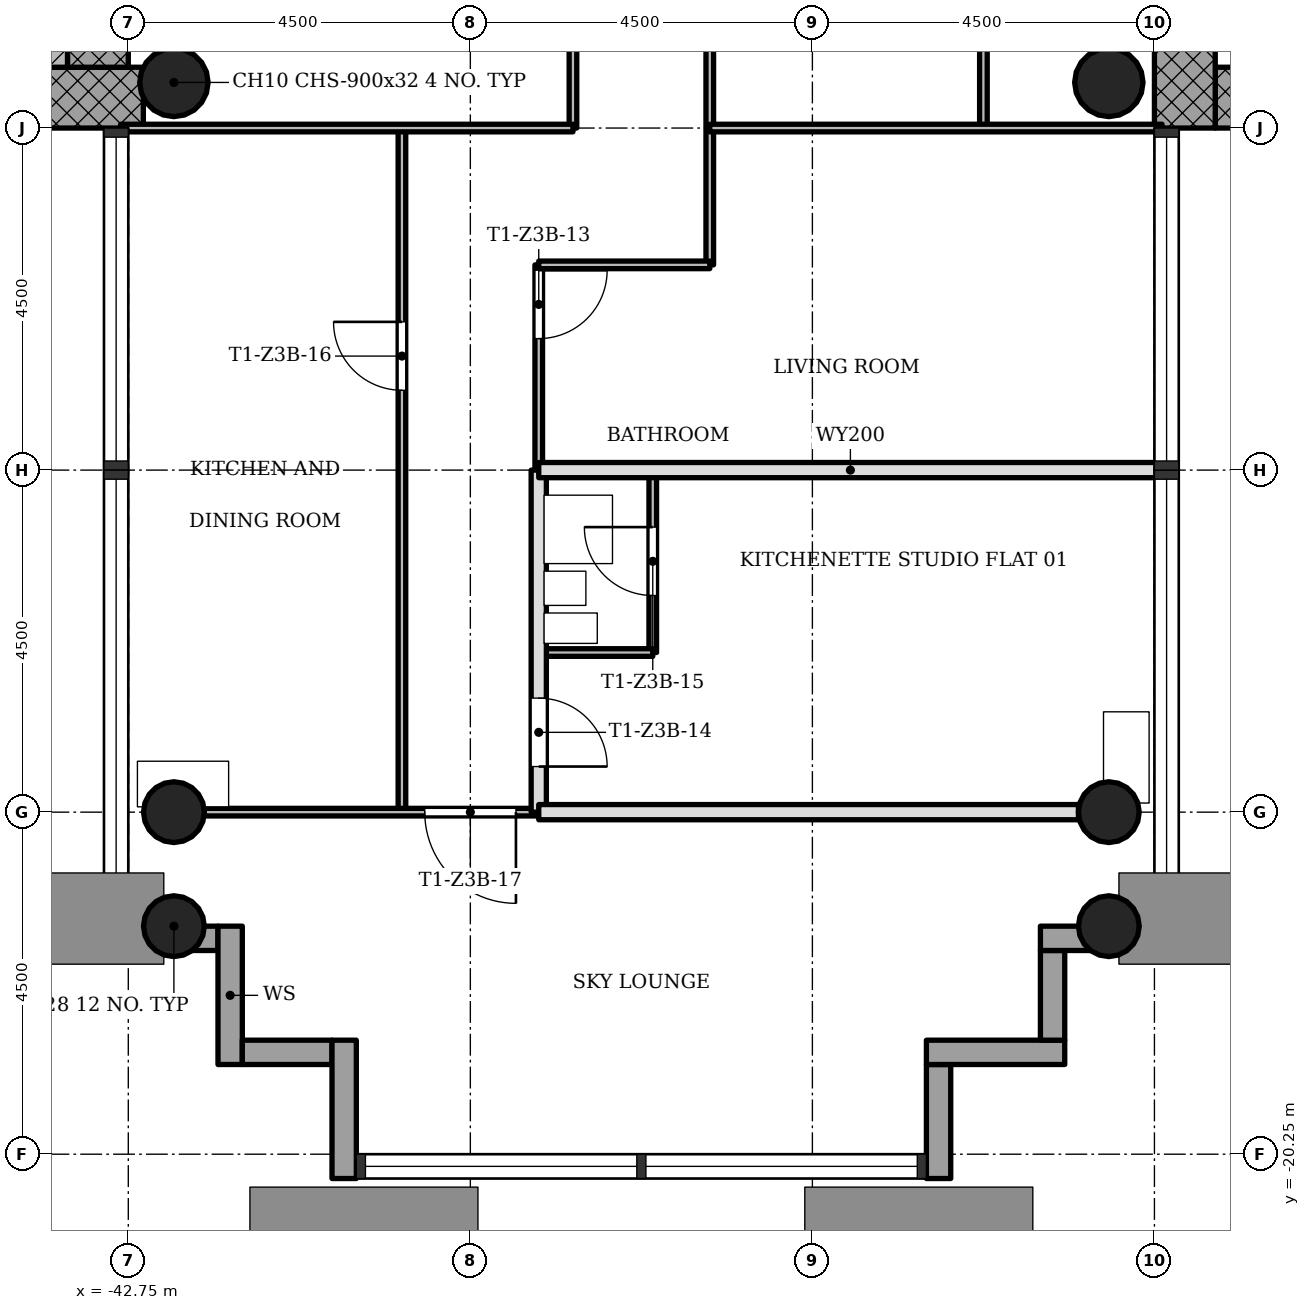
"""IFC4 building model, lengths in metres.
Left out: names, types, materials, properties, quantities, classifications, styles, units other than length and angle.
Written with IfcOpenShell. Run it as: python <this file> out.ifc"""

import sys

from ifc_helpers import new_model, si_unit, direction, frame, frame_2d, origin, origin_2d, place, context, subcontext, project, spatial, rectangle, hollow_circle, extrude, element, fill, save


model = new_model("IFC4")
c1 = context("Model", 3, precision=1e-05, world=origin(), true_north=direction((0.0, 1.0)))
c2 = subcontext(c1, "Body", "Model", "MODEL_VIEW")
j1 = project(units=[si_unit("LENGTHUNIT", "METRE"), si_unit("PLANEANGLEUNIT", "RADIAN")], contexts=[c1])
p1 = place(None, origin())
s1 = spatial("IfcSite", under=j1, at=p1, CompositionType="ELEMENT")
p2 = place(p1, origin())
s2 = spatial("IfcBuilding", under=s1, at=p2, CompositionType="ELEMENT")
p3 = place(p2, frame((0.0, 0.0, 150.7)))
s3 = spatial("IfcBuildingStorey", under=s2, at=p3, CompositionType="ELEMENT", Elevation=150.7)
p4 = place(p3, frame((-28.45, -6.35, 0.0), z_axis=(0.0, 0.0, 1.0), x_axis=(1.0, 0.0, 0.0)))
e1 = element("IfcWall", 1, at=p4, inside=s3, PredefinedType="SHEAR", context=c2, shape_type="SweptSolid", body=[
    extrude(rectangle(XDim=8.2, YDim=0.8, at=frame_2d((4.1, 0.0))), origin(), (0.0, 0.0, 1.0), 3.4),
])
p5 = place(p3, frame((-28.85, 5.95, 0.0), z_axis=(0.0, 0.0, 1.0), x_axis=(0.0, -1.0, 0.0)))
e2 = element("IfcWall", 2, at=p5, inside=s3, PredefinedType="SHEAR", context=c2, shape_type="SweptSolid", body=[
    extrude(rectangle(XDim=12.7, YDim=0.8, at=frame_2d((6.35, 0.0))), origin(), (0.0, 0.0, 1.0), 3.4),
])
p6 = place(p5, frame((5.05, 0.0, 0.0)))
e3 = element("IfcOpeningElement", 3, at=p6, cuts=e2, PredefinedType="OPENING", context=c2, shape_type="SweptSolid", body=[
    extrude(rectangle(XDim=1.8, YDim=2.1, at=frame_2d((0.9, 1.05))), frame((0.0, 0.41, 0.0), z_axis=(0.0, -1.0, 0.0), x_axis=(1.0, 0.0, 0.0)), (0.0, 0.0, 1.0), 0.82),
])
p7 = place(p3, frame((-50.95, -6.35, 0.0), z_axis=(0.0, 0.0, 1.0), x_axis=(1.0, 0.0, 0.0)))
e4 = element("IfcWall", 4, at=p7, inside=s3, PredefinedType="SHEAR", context=c2, shape_type="SweptSolid", body=[
    extrude(rectangle(XDim=8.398, YDim=0.8, at=frame_2d((4.199, 0.0))), origin(), (0.0, 0.0, 1.0), 3.4),
])
p8 = place(p3, frame((-43.15, -5.95, 0.0), z_axis=(0.0, 0.0, 1.0), x_axis=(0.0, 1.0, 0.0)))
e5 = element("IfcWall", 5, at=p8, inside=s3, PredefinedType="SHEAR", context=c2, shape_type="SweptSolid", body=[
    extrude(rectangle(XDim=12.7, YDim=0.8, at=frame_2d((6.35, 0.0))), origin(), (0.0, 0.0, 1.0), 3.4),
])
p9 = place(p8, frame((5.05, 0.0, 0.0)))
e6 = element("IfcOpeningElement", 6, at=p9, cuts=e5, PredefinedType="OPENING", context=c2, shape_type="SweptSolid", body=[
    extrude(rectangle(XDim=1.8, YDim=2.1, at=frame_2d((0.9, 1.05))), frame((0.0, 0.41, 0.0), z_axis=(0.0, -1.0, 0.0), x_axis=(1.0, 0.0, 0.0)), (0.0, 0.0, 1.0), 0.82),
])
for number, where, z_axis, x_axis in (
    (7, (-42.15, -15.75, 0.0), (0.0, 0.0, 1.0), (1.0, 0.0, 0.0)),
    (8, (-29.85, -15.75, 0.0), (0.0, 0.0, 1.0), (1.0, 0.0, 0.0)),
    (9, (-42.15, -17.25, 0.0), (0.0, 0.0, 1.0), (1.0, 0.0, 0.0)),
    (10, (-29.85, -17.25, 0.0), (0.0, 0.0, 1.0), (1.0, 0.0, 0.0)),
):
    element("IfcColumn", number, at=place(p3, frame(where, z_axis=z_axis, x_axis=x_axis)), inside=s3, PredefinedType="COLUMN", context=c2, shape_type="SweptSolid", body=[
        extrude(hollow_circle(Radius=0.4, WallThickness=0.028, at=origin_2d()), origin(), (0.0, 0.0, 1.0), 3.4),
    ])
for number, where, z_axis, x_axis in (
    (11, (-42.15, -6.15, 0.0), (0.0, 0.0, 1.0), (1.0, 0.0, 0.0)),
    (12, (-29.85, -6.15, 0.0), (0.0, 0.0, 1.0), (1.0, 0.0, 0.0)),
):
    element("IfcColumn", number, at=place(p3, frame(where, z_axis=z_axis, x_axis=x_axis)), inside=s3, PredefinedType="COLUMN", context=c2, shape_type="SweptSolid", body=[
        extrude(hollow_circle(Radius=0.45, WallThickness=0.032, at=origin_2d()), origin(), (0.0, 0.0, 1.0), 3.4),
    ])
p10 = place(p3, frame((-43.07, -17.41, -0.3), z_axis=(0.0, 0.0, 1.0), x_axis=(1.0, 0.0, 0.0)))
e13 = element("IfcWall", 13, at=p10, inside=s3, PredefinedType="STANDARD", context=c2, shape_type="SweptSolid", body=[
    extrude(rectangle(XDim=1.5, YDim=0.32, at=frame_2d((0.75, 0.0))), origin(), (0.0, 0.0, 1.0), 3.4),
])
p11 = place(p3, frame((-41.41, -17.25, -0.3), z_axis=(0.0, 0.0, 1.0), x_axis=(0.0, -1.0, 0.0)))
e14 = element("IfcWall", 14, at=p11, inside=s3, PredefinedType="STANDARD", context=c2, shape_type="SweptSolid", body=[
    extrude(rectangle(XDim=1.82, YDim=0.32, at=frame_2d((0.91, 0.0))), origin(), (0.0, 0.0, 1.0), 3.4),
])
p12 = place(p3, frame((-41.25, -18.91, -0.3), z_axis=(0.0, 0.0, 1.0), x_axis=(1.0, 0.0, 0.0)))
e15 = element("IfcWall", 15, at=p12, inside=s3, PredefinedType="STANDARD", context=c2, shape_type="SweptSolid", body=[
    extrude(rectangle(XDim=1.18, YDim=0.32, at=frame_2d((0.59, 0.0))), origin(), (0.0, 0.0, 1.0), 3.4),
])
p13 = place(p3, frame((-39.91, -18.75, -0.3), z_axis=(0.0, 0.0, 1.0), x_axis=(0.0, -1.0, 0.0)))
e16 = element("IfcWall", 16, at=p13, inside=s3, PredefinedType="STANDARD", context=c2, shape_type="SweptSolid", body=[
    extrude(rectangle(XDim=1.82, YDim=0.32, at=frame_2d((0.91, 0.0))), origin(), (0.0, 0.0, 1.0), 3.4),
])
p14 = place(p3, frame((-32.09, -20.57, -0.3), z_axis=(0.0, 0.0, 1.0), x_axis=(0.0, 1.0, 0.0)))
e17 = element("IfcWall", 17, at=p14, inside=s3, PredefinedType="STANDARD", context=c2, shape_type="SweptSolid", body=[
    extrude(rectangle(XDim=1.5, YDim=0.32, at=frame_2d((0.75, 0.0))), origin(), (0.0, 0.0, 1.0), 3.4),
])
p15 = place(p3, frame((-32.25, -18.91, -0.3), z_axis=(0.0, 0.0, 1.0), x_axis=(1.0, 0.0, 0.0)))
e18 = element("IfcWall", 18, at=p15, inside=s3, PredefinedType="STANDARD", context=c2, shape_type="SweptSolid", body=[
    extrude(rectangle(XDim=1.82, YDim=0.32, at=frame_2d((0.91, 0.0))), origin(), (0.0, 0.0, 1.0), 3.4),
])
p16 = place(p3, frame((-30.59, -18.75, -0.3), z_axis=(0.0, 0.0, 1.0), x_axis=(0.0, 1.0, 0.0)))
e19 = element("IfcWall", 19, at=p16, inside=s3, PredefinedType="STANDARD", context=c2, shape_type="SweptSolid", body=[
    extrude(rectangle(XDim=1.18, YDim=0.32, at=frame_2d((0.59, 0.0))), origin(), (0.0, 0.0, 1.0), 3.4),
])
p17 = place(p3, frame((-30.75, -17.41, -0.3), z_axis=(0.0, 0.0, 1.0), x_axis=(1.0, 0.0, 0.0)))
e20 = element("IfcWall", 20, at=p17, inside=s3, PredefinedType="STANDARD", context=c2, shape_type="SweptSolid", body=[
    extrude(rectangle(XDim=1.82, YDim=0.32, at=frame_2d((0.91, 0.0))), origin(), (0.0, 0.0, 1.0), 3.4),
])
p18 = place(p3, frame((-39.15, -15.75, 0.0), z_axis=(0.0, 0.0, 1.0), x_axis=(0.0, 1.0, 0.0)))
e21 = element("IfcWall", 21, at=p18, inside=s3, PredefinedType="PARTITIONING", context=c2, shape_type="SweptSolid", body=[
    extrude(rectangle(XDim=9.0, YDim=0.1, at=frame_2d((4.5, 0.0))), origin(), (0.0, 0.0, 1.0), 3.0),
])
p19 = place(p18, frame((5.55, 0.0, 0.0)))
e22 = element("IfcOpeningElement", 22, at=p19, cuts=e21, PredefinedType="OPENING", context=c2, shape_type="SweptSolid", body=[
    extrude(rectangle(XDim=0.9, YDim=2.1, at=frame_2d((0.45, 1.05))), frame((0.0, 0.06, 0.0), z_axis=(0.0, -1.0, 0.0), x_axis=(1.0, 0.0, 0.0)), (0.0, 0.0, 1.0), 0.12),
])
p20 = place(p3, frame((-37.35, -11.25, 0.0), z_axis=(0.0, 0.0, 1.0), x_axis=(0.0, 1.0, 0.0)))
e23 = element("IfcWall", 23, at=p20, inside=s3, PredefinedType="PARTITIONING", context=c2, shape_type="SweptSolid", body=[
    extrude(rectangle(XDim=2.7, YDim=0.1, at=frame_2d((1.35, 0.0))), origin(), (0.0, 0.0, 1.0), 3.0),
])
p21 = place(p20, frame((1.73, 0.0, 0.0)))
e24 = element("IfcOpeningElement", 24, at=p21, cuts=e23, PredefinedType="OPENING", context=c2, shape_type="SweptSolid", body=[
    extrude(rectangle(XDim=0.9, YDim=2.1, at=frame_2d((0.45, 1.05))), frame((0.0, 0.06, 0.0), z_axis=(0.0, -1.0, 0.0), x_axis=(1.0, 0.0, 0.0)), (0.0, 0.0, 1.0), 0.12),
])
p22 = place(p3, frame((-37.35, -15.75, 0.0), z_axis=(0.0, 0.0, 1.0), x_axis=(0.0, 1.0, 0.0)))
e25 = element("IfcWall", 25, at=p22, inside=s3, PredefinedType="SOLIDWALL", context=c2, shape_type="SweptSolid", body=[
    extrude(rectangle(XDim=4.5, YDim=0.2, at=frame_2d((2.25, 0.0))), origin(), (0.0, 0.0, 1.0), 3.0),
])
p23 = place(p22, frame((0.6, 0.0, 0.0)))
e26 = element("IfcOpeningElement", 26, at=p23, cuts=e25, PredefinedType="OPENING", context=c2, shape_type="SweptSolid", body=[
    extrude(rectangle(XDim=0.9, YDim=2.1, at=frame_2d((0.45, 1.05))), frame((0.0, 0.11, 0.0), z_axis=(0.0, -1.0, 0.0), x_axis=(1.0, 0.0, 0.0)), (0.0, 0.0, 1.0), 0.22),
])
p24 = place(p3, frame((-36.9, -6.75, 0.0), z_axis=(0.0, 0.0, 1.0), x_axis=(0.0, 1.0, 0.0)))
e27 = element("IfcWall", 27, at=p24, inside=s3, PredefinedType="PARTITIONING", context=c2, shape_type="SweptSolid", body=[
    extrude(rectangle(XDim=2.25, YDim=0.1, at=frame_2d((1.125, 0.0))), origin(), (0.0, 0.0, 1.0), 3.0),
])
p25 = place(p3, frame((-35.85, -13.65, 0.0), z_axis=(0.0, 0.0, 1.0), x_axis=(0.0, 1.0, 0.0)))
e28 = element("IfcWall", 28, at=p25, inside=s3, PredefinedType="PARTITIONING", context=c2, shape_type="SweptSolid", body=[
    extrude(rectangle(XDim=2.4, YDim=0.1, at=frame_2d((1.2, 0.0))), origin(), (0.0, 0.0, 1.0), 3.0),
])
p26 = place(p25, frame((0.75, 0.0, 0.0)))
e29 = element("IfcOpeningElement", 29, at=p26, cuts=e28, PredefinedType="OPENING", context=c2, shape_type="SweptSolid", body=[
    extrude(rectangle(XDim=0.9, YDim=2.1, at=frame_2d((0.45, 1.05))), frame((0.0, 0.06, 0.0), z_axis=(0.0, -1.0, 0.0), x_axis=(1.0, 0.0, 0.0)), (0.0, 0.0, 1.0), 0.12),
])
p27 = place(p3, frame((-35.1, -8.55, 0.0), z_axis=(0.0, 0.0, 1.0), x_axis=(0.0, 1.0, 0.0)))
e30 = element("IfcWall", 30, at=p27, inside=s3, PredefinedType="PARTITIONING", context=c2, shape_type="SweptSolid", body=[
    extrude(rectangle(XDim=4.05, YDim=0.1, at=frame_2d((2.025, 0.0))), origin(), (0.0, 0.0, 1.0), 3.0),
])
p28 = place(p3, frame((-31.5, -6.75, 0.0), z_axis=(0.0, 0.0, 1.0), x_axis=(0.0, 1.0, 0.0)))
e31 = element("IfcWall", 31, at=p28, inside=s3, PredefinedType="PARTITIONING", context=c2, shape_type="SweptSolid", body=[
    extrude(rectangle(XDim=5.25, YDim=0.1, at=frame_2d((2.625, 0.0))), origin(), (0.0, 0.0, 1.0), 3.0),
])
p29 = place(p28, frame((3.3, 0.0, 0.0)))
e32 = element("IfcOpeningElement", 32, at=p29, cuts=e31, PredefinedType="OPENING", context=c2, shape_type="SweptSolid", body=[
    extrude(rectangle(XDim=0.9, YDim=2.1, at=frame_2d((0.45, 1.05))), frame((0.0, 0.06, 0.0), z_axis=(0.0, -1.0, 0.0), x_axis=(1.0, 0.0, 0.0)), (0.0, 0.0, 1.0), 0.12),
])
p30 = place(p3, frame((-41.75, -15.75, 0.0), z_axis=(0.0, 0.0, 1.0), x_axis=(1.0, 0.0, 0.0)))
e33 = element("IfcWall", 33, at=p30, inside=s3, PredefinedType="PARTITIONING", context=c2, shape_type="SweptSolid", body=[
    extrude(rectangle(XDim=4.4, YDim=0.1, at=frame_2d((2.2, 0.0))), origin(), (0.0, 0.0, 1.0), 3.0),
])
p31 = place(p30, frame((2.9, 0.0, 0.0)))
e34 = element("IfcOpeningElement", 34, at=p31, cuts=e33, PredefinedType="OPENING", context=c2, shape_type="SweptSolid", body=[
    extrude(rectangle(XDim=1.2, YDim=2.1, at=frame_2d((0.6, 1.05))), frame((0.0, 0.06, 0.0), z_axis=(0.0, -1.0, 0.0), x_axis=(1.0, 0.0, 0.0)), (0.0, 0.0, 1.0), 0.12),
])
p32 = place(p3, frame((-37.35, -15.75, 0.0), z_axis=(0.0, 0.0, 1.0), x_axis=(1.0, 0.0, 0.0)))
e35 = element("IfcWall", 35, at=p32, inside=s3, PredefinedType="SOLIDWALL", context=c2, shape_type="SweptSolid", body=[
    extrude(rectangle(XDim=7.1, YDim=0.2, at=frame_2d((3.55, 0.0))), origin(), (0.0, 0.0, 1.0), 3.0),
])
p33 = place(p3, frame((-37.35, -13.65, 0.0), z_axis=(0.0, 0.0, 1.0), x_axis=(1.0, 0.0, 0.0)))
e36 = element("IfcWall", 36, at=p33, inside=s3, PredefinedType="PARTITIONING", context=c2, shape_type="SweptSolid", body=[
    extrude(rectangle(XDim=1.5, YDim=0.1, at=frame_2d((0.75, 0.0))), origin(), (0.0, 0.0, 1.0), 3.0),
])
p34 = place(p3, frame((-37.35, -11.25, 0.0), z_axis=(0.0, 0.0, 1.0), x_axis=(1.0, 0.0, 0.0)))
e37 = element("IfcWall", 37, at=p34, inside=s3, PredefinedType="SOLIDWALL", context=c2, shape_type="SweptSolid", body=[
    extrude(rectangle(XDim=8.2, YDim=0.2, at=frame_2d((4.1, 0.0))), origin(), (0.0, 0.0, 1.0), 3.0),
])
p35 = place(p3, frame((-37.35, -8.55, 0.0), z_axis=(0.0, 0.0, 1.0), x_axis=(1.0, 0.0, 0.0)))
e38 = element("IfcWall", 38, at=p35, inside=s3, PredefinedType="PARTITIONING", context=c2, shape_type="SweptSolid", body=[
    extrude(rectangle(XDim=2.25, YDim=0.1, at=frame_2d((1.125, 0.0))), origin(), (0.0, 0.0, 1.0), 3.0),
])
for number, where, z_axis, x_axis in (
    (39, (-42.85, -6.75, 0.0), (0.0, 0.0, 1.0), (1.0, 0.0, 0.0)),
    (40, (-35.1, -6.75, 0.0), (0.0, 0.0, 1.0), (1.0, 0.0, 0.0)),
):
    element("IfcWall", number, at=place(p3, frame(where, z_axis=z_axis, x_axis=x_axis)), inside=s3, PredefinedType="PARTITIONING", context=c2, shape_type="SweptSolid", body=[
        extrude(rectangle(XDim=5.95, YDim=0.1, at=frame_2d((2.975, 0.0))), origin(), (0.0, 0.0, 1.0), 3.0),
    ])
p36 = place(p3, frame((-43.75, -1.85, 0.0), z_axis=(0.0, 0.0, 1.0), x_axis=(0.0, -1.0, 0.0)))
e41 = element("IfcWall", 41, at=p36, inside=s3, PredefinedType="SHEAR", context=c2, shape_type="SweptSolid", body=[
    extrude(rectangle(XDim=4.1, YDim=0.4, at=frame_2d((2.05, 0.0))), origin(), (0.0, 0.0, 1.0), 3.4),
])
p37 = place(p21, origin())
e42 = element("IfcDoor", 42, at=p37, inside=s3, OperationType="SINGLE_SWING_RIGHT", PredefinedType="DOOR", context=c2, shape_type="SweptSolid", body=[
    extrude(rectangle(XDim=0.9, YDim=2.1, at=frame_2d((0.45, 1.05))), frame((0.0, 0.025, 0.0), z_axis=(0.0, -1.0, 0.0), x_axis=(1.0, 0.0, 0.0)), (0.0, 0.0, 1.0), 0.05),
])
fill(e24, e42)
p38 = place(p23, origin())
e43 = element("IfcDoor", 43, at=p38, inside=s3, OperationType="SINGLE_SWING_LEFT", PredefinedType="DOOR", context=c2, shape_type="SweptSolid", body=[
    extrude(rectangle(XDim=0.9, YDim=2.1, at=frame_2d((0.45, 1.05))), frame((0.0, 0.025, 0.0), z_axis=(0.0, -1.0, 0.0), x_axis=(1.0, 0.0, 0.0)), (0.0, 0.0, 1.0), 0.05),
])
fill(e26, e43)
p39 = place(p26, origin())
e44 = element("IfcDoor", 44, at=p39, inside=s3, OperationType="SINGLE_SWING_LEFT", PredefinedType="DOOR", context=c2, shape_type="SweptSolid", body=[
    extrude(rectangle(XDim=0.9, YDim=2.1, at=frame_2d((0.45, 1.05))), frame((0.0, 0.025, 0.0), z_axis=(0.0, -1.0, 0.0), x_axis=(1.0, 0.0, 0.0)), (0.0, 0.0, 1.0), 0.05),
])
fill(e29, e44)
p40 = place(p19, origin())
e45 = element("IfcDoor", 45, at=p40, inside=s3, OperationType="SINGLE_SWING_LEFT", PredefinedType="DOOR", context=c2, shape_type="SweptSolid", body=[
    extrude(rectangle(XDim=0.9, YDim=2.1, at=frame_2d((0.45, 1.05))), frame((0.0, 0.025, 0.0), z_axis=(0.0, -1.0, 0.0), x_axis=(1.0, 0.0, 0.0)), (0.0, 0.0, 1.0), 0.05),
])
fill(e22, e45)
p41 = place(p31, origin())
e46 = element("IfcDoor", 46, at=p41, inside=s3, OperationType="SINGLE_SWING_RIGHT", PredefinedType="DOOR", context=c2, shape_type="SweptSolid", body=[
    extrude(rectangle(XDim=1.2, YDim=2.1, at=frame_2d((0.6, 1.05))), frame((0.0, 0.025, 0.0), z_axis=(0.0, -1.0, 0.0), x_axis=(1.0, 0.0, 0.0)), (0.0, 0.0, 1.0), 0.05),
])
fill(e34, e46)
save(model, sys.argv[1])
